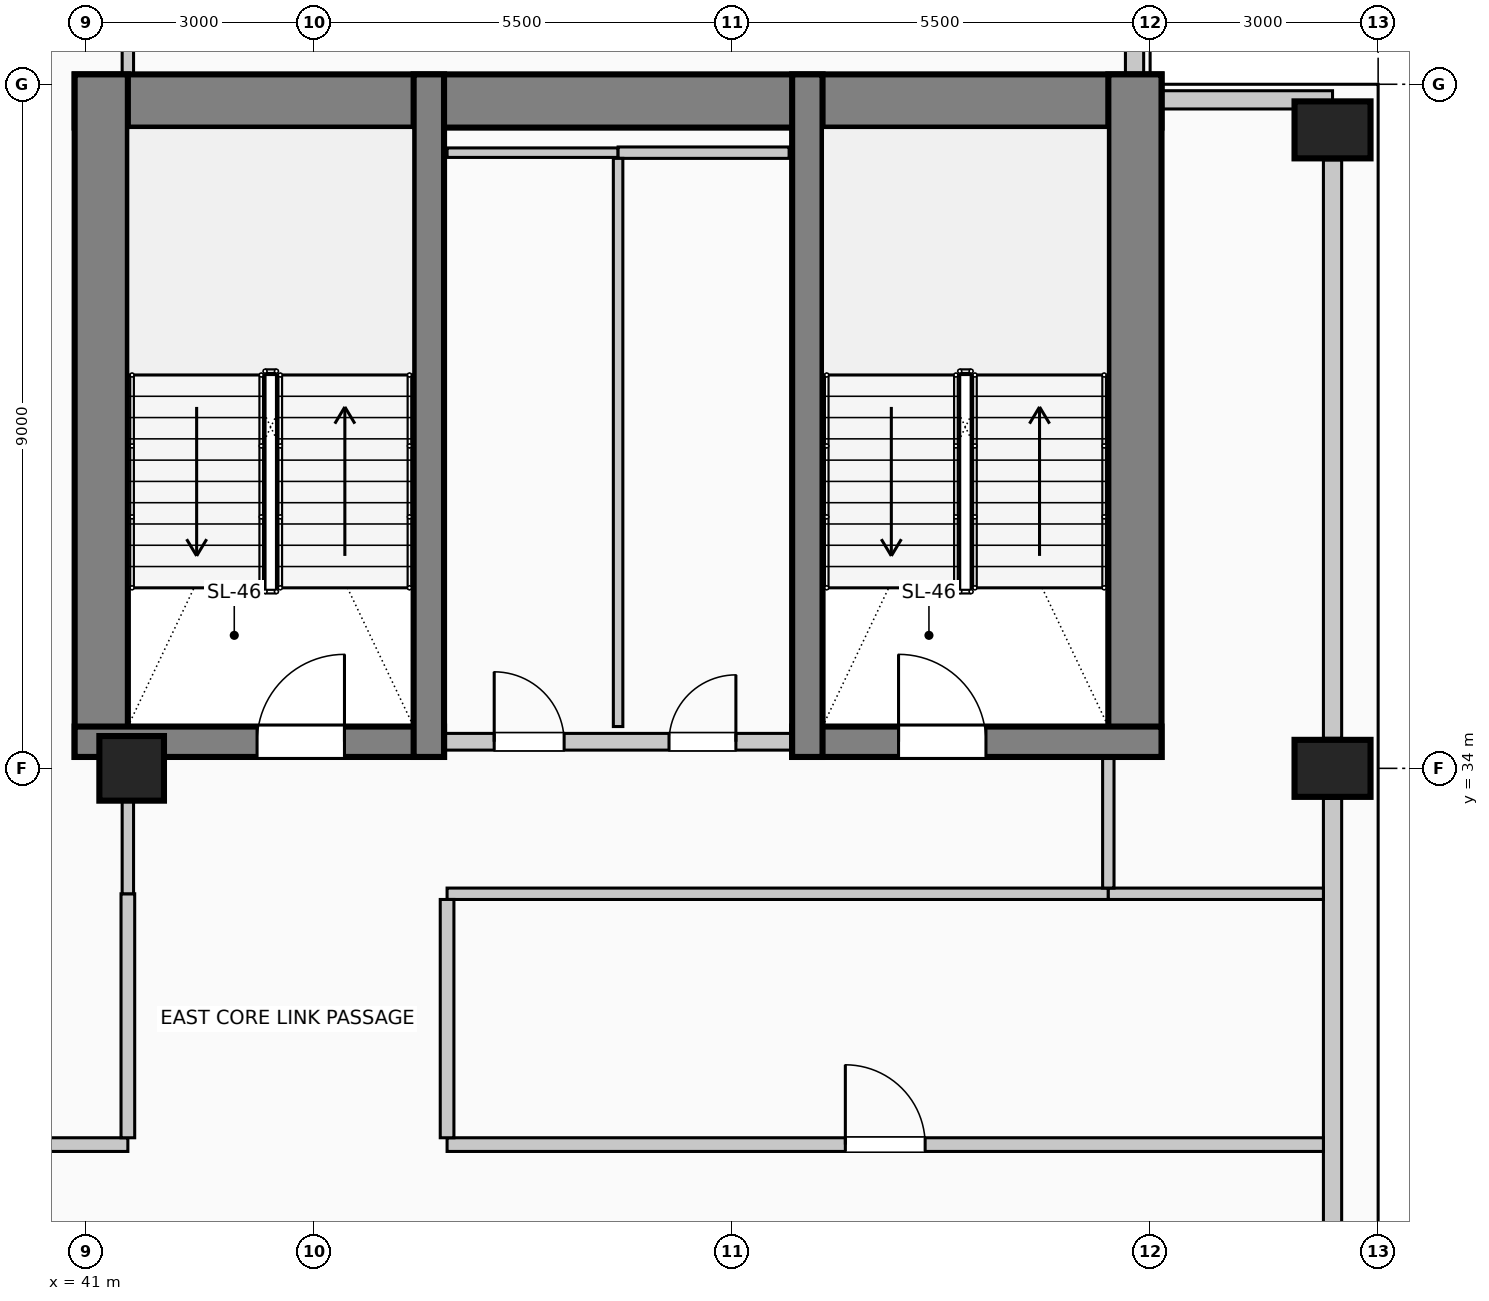
"""IFC4 building model, lengths in metres.
Left out: names, types, materials, properties, quantities, classifications, styles, units other than length and angle.
Written with IfcOpenShell. Run it as: python <this file> out.ifc"""

import sys

from ifc_helpers import new_model, si_unit, direction, frame, frame_2d, origin, origin_2d, place, context, subcontext, project, spatial, rectangle, circle, extrude, element, fill, save


model = new_model("IFC4")
c1 = context("Model", 3, precision=1e-05, world=origin(), true_north=direction((0.0, 1.0)))
c2 = subcontext(c1, "Body", "Model", "MODEL_VIEW")
j1 = project(units=[si_unit("LENGTHUNIT", "METRE"), si_unit("PLANEANGLEUNIT", "RADIAN")], contexts=[c1])
p1 = place(None, origin())
s1 = spatial("IfcSite", under=j1, at=p1, CompositionType="ELEMENT")
p2 = place(p1, origin())
s2 = spatial("IfcBuilding", under=s1, at=p2, CompositionType="ELEMENT")
p3 = place(p2, frame((0.0, 0.0, 256.6)))
s3 = spatial("IfcBuildingStorey", under=s2, at=p3, CompositionType="ELEMENT", Elevation=256.6)
p4 = place(p3, frame((40.85, 42.78, 0.0), z_axis=(0.0, 0.0, 1.0), x_axis=(1.0, 0.0, 0.0)))
e1 = element("IfcWall", 1, at=p4, inside=s3, PredefinedType="SHEAR", context=c2, shape_type="SweptSolid", body=[
    extrude(rectangle(XDim=14.3, YDim=0.7, at=frame_2d((7.15, 0.0))), origin(), (0.0, 0.0, 1.0), 4.0),
])
for number, where, z_axis, x_axis in (
    (2, (41.2, 34.15, 0.0), (0.0, 0.0, 1.0), (0.0, 1.0, 0.0)),
    (3, (54.8, 34.15, 0.0), (0.0, 0.0, 1.0), (0.0, 1.0, 0.0)),
):
    element("IfcWall", number, at=place(p3, frame(where, z_axis=z_axis, x_axis=x_axis)), inside=s3, PredefinedType="SHEAR", context=c2, shape_type="SweptSolid", body=[
        extrude(rectangle(XDim=8.98, YDim=0.7, at=frame_2d((4.49, 0.0))), origin(), (0.0, 0.0, 1.0), 4.0),
    ])
p5 = place(p3, frame((40.85, 34.35, 0.0), z_axis=(0.0, 0.0, 1.0), x_axis=(1.0, 0.0, 0.0)))
e4 = element("IfcWall", 4, at=p5, inside=s3, PredefinedType="SHEAR", context=c2, shape_type="SweptSolid", body=[
    extrude(rectangle(XDim=4.86, YDim=0.4, at=frame_2d((2.43, 0.0))), origin(), (0.0, 0.0, 1.0), 4.0),
])
p6 = place(p5, frame((2.4, 0.0, 0.0)))
e5 = element("IfcOpeningElement", 5, at=p6, cuts=e4, PredefinedType="OPENING", context=c2, shape_type="SweptSolid", body=[
    extrude(rectangle(XDim=1.15, YDim=2.2, at=frame_2d((0.575, 1.1))), frame((0.0, 0.21, 0.0), z_axis=(0.0, -1.0, 0.0), x_axis=(1.0, 0.0, 0.0)), (0.0, 0.0, 1.0), 0.42),
])
p7 = place(p3, frame((45.51, 34.15, 0.0), z_axis=(0.0, 0.0, 1.0), x_axis=(0.0, 1.0, 0.0)))
e6 = element("IfcWall", 6, at=p7, inside=s3, PredefinedType="SHEAR", context=c2, shape_type="SweptSolid", body=[
    extrude(rectangle(XDim=8.98, YDim=0.4, at=frame_2d((4.49, 0.0))), origin(), (0.0, 0.0, 1.0), 4.0),
])
p8 = place(p3, frame((50.29, 34.35, 0.0), z_axis=(0.0, 0.0, 1.0), x_axis=(1.0, 0.0, 0.0)))
e7 = element("IfcWall", 7, at=p8, inside=s3, PredefinedType="SHEAR", context=c2, shape_type="SweptSolid", body=[
    extrude(rectangle(XDim=4.86, YDim=0.4, at=frame_2d((2.43, 0.0))), origin(), (0.0, 0.0, 1.0), 4.0),
])
p9 = place(p8, frame((1.4, 0.0, 0.0)))
e8 = element("IfcOpeningElement", 8, at=p9, cuts=e7, PredefinedType="OPENING", context=c2, shape_type="SweptSolid", body=[
    extrude(rectangle(XDim=1.15, YDim=2.2, at=frame_2d((0.575, 1.1))), frame((0.0, 0.21, 0.0), z_axis=(0.0, -1.0, 0.0), x_axis=(1.0, 0.0, 0.0)), (0.0, 0.0, 1.0), 0.42),
])
p10 = place(p3, frame((50.49, 34.15, 0.0), z_axis=(0.0, 0.0, 1.0), x_axis=(0.0, 1.0, 0.0)))
e9 = element("IfcWall", 9, at=p10, inside=s3, PredefinedType="SHEAR", context=c2, shape_type="SweptSolid", body=[
    extrude(rectangle(XDim=8.98, YDim=0.4, at=frame_2d((4.49, 0.0))), origin(), (0.0, 0.0, 1.0), 4.0),
])
for number, where, z_axis, x_axis in (
    (10, (57.4, 34.0, 0.0), (0.0, 0.0, 1.0), (0.0, 1.0, 0.0)),
    (11, (57.4, 42.4, 0.0), (0.0, 0.0, 1.0), (0.0, 1.0, 0.0)),
):
    element("IfcColumn", number, at=place(p3, frame(where, z_axis=z_axis, x_axis=x_axis)), inside=s3, PredefinedType="COLUMN", context=c2, shape_type="SweptSolid", body=[
        extrude(rectangle(XDim=0.75, YDim=1.0, at=origin_2d()), origin(), (0.0, 0.0, 1.0), 4.0),
    ])
p11 = place(p3, frame((41.6, 34.0, 0.0), z_axis=(0.0, 0.0, 1.0), x_axis=(1.0, 0.0, 0.0)))
e12 = element("IfcColumn", 12, at=p11, inside=s3, PredefinedType="COLUMN", context=c2, shape_type="SweptSolid", body=[
    extrude(circle(Radius=0.425, at=origin_2d()), origin(), (0.0, 0.0, 1.0), 4.0),
])
p12 = place(p3, frame((57.4, 33.605, 0.0), z_axis=(0.0, 0.0, 1.0), x_axis=(0.0, -1.0, 0.0)))
e13 = element("IfcWall", 13, at=p12, inside=s3, PredefinedType="SOLIDWALL", context=c2, shape_type="SweptSolid", body=[
    extrude(rectangle(XDim=7.21, YDim=0.24, at=frame_2d((3.605, 0.0))), origin(), (0.0, 0.0, 1.0), 3.0),
])
p13 = place(p3, frame((57.4, 42.005, 0.0), z_axis=(0.0, 0.0, 1.0), x_axis=(0.0, -1.0, 0.0)))
e14 = element("IfcWall", 14, at=p13, inside=s3, PredefinedType="SOLIDWALL", context=c2, shape_type="SweptSolid", body=[
    extrude(rectangle(XDim=7.61, YDim=0.24, at=frame_2d((3.805, 0.0))), origin(), (0.0, 0.0, 1.0), 3.0),
])
p14 = place(p3, frame((54.795, 45.4, 0.0), z_axis=(0.0, 0.0, 1.0), x_axis=(0.0, -1.0, 0.0)))
e15 = element("IfcWall", 15, at=p14, inside=s3, PredefinedType="SOLIDWALL", context=c2, shape_type="SweptSolid", body=[
    extrude(rectangle(XDim=2.265, YDim=0.24, at=frame_2d((1.132, 0.0))), origin(), (0.0, 0.0, 1.0), 3.75),
])
p15 = place(p3, frame((55.155, 42.795, 0.0), z_axis=(0.0, 0.0, 1.0), x_axis=(1.0, 0.0, 0.0)))
e16 = element("IfcWall", 16, at=p15, inside=s3, PredefinedType="SOLIDWALL", context=c2, shape_type="SweptSolid", body=[
    extrude(rectangle(XDim=2.245, YDim=0.24, at=frame_2d((1.123, 0.0))), origin(), (0.0, 0.0, 1.0), 3.75),
])
p16 = place(p3, frame((45.72, 34.35, 0.0), z_axis=(0.0, 0.0, 1.0), x_axis=(1.0, 0.0, 0.0)))
e17 = element("IfcWall", 17, at=p16, inside=s3, PredefinedType="PARTITIONING", context=c2, shape_type="SweptSolid", body=[
    extrude(rectangle(XDim=4.56, YDim=0.22, at=frame_2d((2.28, 0.0))), origin(), (0.0, 0.0, 1.0), 3.75),
])
p17 = place(p16, frame((0.65, 0.0, 0.0)))
e18 = element("IfcOpeningElement", 18, at=p17, cuts=e17, PredefinedType="OPENING", context=c2, shape_type="SweptSolid", body=[
    extrude(rectangle(XDim=0.92, YDim=2.1, at=frame_2d((0.46, 1.05))), frame((0.0, 0.12, 0.0), z_axis=(0.0, -1.0, 0.0), x_axis=(1.0, 0.0, 0.0)), (0.0, 0.0, 1.0), 0.24),
])
p18 = place(p16, frame((2.95, 0.0, 0.0)))
e19 = element("IfcOpeningElement", 19, at=p18, cuts=e17, PredefinedType="OPENING", context=c2, shape_type="SweptSolid", body=[
    extrude(rectangle(XDim=0.88, YDim=2.1, at=frame_2d((0.44, 1.05))), frame((0.0, 0.12, 0.0), z_axis=(0.0, -1.0, 0.0), x_axis=(1.0, 0.0, 0.0)), (0.0, 0.0, 1.0), 0.24),
])
p19 = place(p3, frame((30.43, 29.05, 0.0), z_axis=(0.0, 0.0, 1.0), x_axis=(1.0, 0.0, 0.0)))
e20 = element("IfcWall", 20, at=p19, inside=s3, PredefinedType="PARTITIONING", context=c2, shape_type="SweptSolid", body=[
    extrude(rectangle(XDim=11.12, YDim=0.18, at=frame_2d((5.56, 0.0))), origin(), (0.0, 0.0, 1.0), 3.75),
])
p20 = place(p19, frame((5.085, 0.0, 0.0)))
e21 = element("IfcOpeningElement", 21, at=p20, cuts=e20, PredefinedType="OPENING", context=c2, shape_type="SweptSolid", body=[
    extrude(rectangle(XDim=0.95, YDim=2.15, at=frame_2d((0.475, 1.075))), frame((0.0, 0.1, 0.0), z_axis=(0.0, -1.0, 0.0), x_axis=(1.0, 0.0, 0.0)), (0.0, 0.0, 1.0), 0.2),
])
p21 = place(p3, frame((45.75, 29.05, 0.0), z_axis=(0.0, 0.0, 1.0), x_axis=(1.0, 0.0, 0.0)))
e22 = element("IfcWall", 22, at=p21, inside=s3, PredefinedType="PARTITIONING", context=c2, shape_type="SweptSolid", body=[
    extrude(rectangle(XDim=11.53, YDim=0.18, at=frame_2d((5.765, 0.0))), origin(), (0.0, 0.0, 1.0), 3.75),
])
p22 = place(p21, frame((5.24, 0.0, 0.0)))
e23 = element("IfcOpeningElement", 23, at=p22, cuts=e22, PredefinedType="OPENING", context=c2, shape_type="SweptSolid", body=[
    extrude(rectangle(XDim=1.05, YDim=2.15, at=frame_2d((0.525, 1.075))), frame((0.0, 0.1, 0.0), z_axis=(0.0, -1.0, 0.0), x_axis=(1.0, 0.0, 0.0)), (0.0, 0.0, 1.0), 0.2),
])
p23 = place(p3, frame((45.75, 32.35, 0.0), z_axis=(0.0, 0.0, 1.0), x_axis=(1.0, 0.0, 0.0)))
e24 = element("IfcWall", 24, at=p23, inside=s3, PredefinedType="PARTITIONING", context=c2, shape_type="SweptSolid", body=[
    extrude(rectangle(XDim=8.7, YDim=0.15, at=frame_2d((4.35, 0.0))), origin(), (0.0, 0.0, 1.0), 3.75),
])
p24 = place(p3, frame((54.45, 32.35, 0.0), z_axis=(0.0, 0.0, 1.0), x_axis=(1.0, 0.0, 0.0)))
e25 = element("IfcWall", 25, at=p24, inside=s3, PredefinedType="PARTITIONING", context=c2, shape_type="SweptSolid", body=[
    extrude(rectangle(XDim=2.83, YDim=0.15, at=frame_2d((1.415, 0.0))), origin(), (0.0, 0.0, 1.0), 3.75),
])
p25 = place(p3, frame((45.75, 42.1, 0.0), z_axis=(0.0, 0.0, 1.0), x_axis=(1.0, 0.0, 0.0)))
e26 = element("IfcWall", 26, at=p25, inside=s3, PredefinedType="PARTITIONING", context=c2, shape_type="SweptSolid", body=[
    extrude(rectangle(XDim=2.25, YDim=0.125, at=frame_2d((1.125, 0.0))), origin(), (0.0, 0.0, 1.0), 3.75),
])
p26 = place(p3, frame((48.0, 42.1, 0.0), z_axis=(0.0, 0.0, 1.0), x_axis=(1.0, 0.0, 0.0)))
e27 = element("IfcWall", 27, at=p26, inside=s3, PredefinedType="PARTITIONING", context=c2, shape_type="SweptSolid", body=[
    extrude(rectangle(XDim=2.25, YDim=0.15, at=frame_2d((1.125, 0.0))), origin(), (0.0, 0.0, 1.0), 3.75),
])
p27 = place(p3, frame((41.55, 29.14, 0.0), z_axis=(0.0, 0.0, 1.0), x_axis=(0.0, 1.0, 0.0)))
e28 = element("IfcWall", 28, at=p27, inside=s3, PredefinedType="PARTITIONING", context=c2, shape_type="SweptSolid", body=[
    extrude(rectangle(XDim=3.21, YDim=0.18, at=frame_2d((1.605, 0.0))), origin(), (0.0, 0.0, 1.0), 3.195),
])
p28 = place(p3, frame((41.55, 32.35, 0.0), z_axis=(0.0, 0.0, 1.0), x_axis=(0.0, 1.0, 0.0)))
e29 = element("IfcWall", 29, at=p28, inside=s3, PredefinedType="PARTITIONING", context=c2, shape_type="SweptSolid", body=[
    extrude(rectangle(XDim=1.225, YDim=0.15, at=frame_2d((0.612, 0.0))), origin(), (0.0, 0.0, 1.0), 3.195),
])
p29 = place(p3, frame((41.55, 43.13, 0.0), z_axis=(0.0, 0.0, 1.0), x_axis=(0.0, 1.0, 0.0)))
e30 = element("IfcWall", 30, at=p29, inside=s3, PredefinedType="PARTITIONING", context=c2, shape_type="SweptSolid", body=[
    extrude(rectangle(XDim=1.62, YDim=0.15, at=frame_2d((0.81, 0.0))), origin(), (0.0, 0.0, 1.0), 3.75),
])
p30 = place(p3, frame((45.75, 29.14, 0.0), z_axis=(0.0, 0.0, 1.0), x_axis=(0.0, 1.0, 0.0)))
e31 = element("IfcWall", 31, at=p30, inside=s3, PredefinedType="PARTITIONING", context=c2, shape_type="SweptSolid", body=[
    extrude(rectangle(XDim=3.135, YDim=0.18, at=frame_2d((1.567, 0.0))), origin(), (0.0, 0.0, 1.0), 3.75),
])
p31 = place(p3, frame((48.0, 34.55, 0.0), z_axis=(0.0, 0.0, 1.0), x_axis=(0.0, 1.0, 0.0)))
e32 = element("IfcWall", 32, at=p31, inside=s3, PredefinedType="PARTITIONING", context=c2, shape_type="SweptSolid", body=[
    extrude(rectangle(XDim=7.475, YDim=0.125, at=frame_2d((3.737, 0.0))), origin(), (0.0, 0.0, 1.0), 3.75),
])
p32 = place(p3, frame((54.45, 32.425, 0.0), z_axis=(0.0, 0.0, 1.0), x_axis=(0.0, 1.0, 0.0)))
e33 = element("IfcWall", 33, at=p32, inside=s3, PredefinedType="PARTITIONING", context=c2, shape_type="SweptSolid", body=[
    extrude(rectangle(XDim=1.725, YDim=0.15, at=frame_2d((0.862, 0.0))), origin(), (0.0, 0.0, 1.0), 3.75),
])
p33 = place(p6, origin())
e34 = element("IfcDoor", 34, at=p33, inside=s3, OperationType="SINGLE_SWING_RIGHT", PredefinedType="DOOR", context=c2, shape_type="SweptSolid", body=[
    extrude(rectangle(XDim=1.15, YDim=2.2, at=frame_2d((0.575, 1.1))), frame((0.0, 0.025, 0.0), z_axis=(0.0, -1.0, 0.0), x_axis=(1.0, 0.0, 0.0)), (0.0, 0.0, 1.0), 0.05),
])
fill(e5, e34)
p34 = place(p17, origin())
e35 = element("IfcDoor", 35, at=p34, inside=s3, OperationType="SINGLE_SWING_LEFT", PredefinedType="DOOR", context=c2, shape_type="SweptSolid", body=[
    extrude(rectangle(XDim=0.92, YDim=2.1, at=frame_2d((0.46, 1.05))), frame((0.0, 0.025, 0.0), z_axis=(0.0, -1.0, 0.0), x_axis=(1.0, 0.0, 0.0)), (0.0, 0.0, 1.0), 0.05),
])
fill(e18, e35)
p35 = place(p18, origin())
e36 = element("IfcDoor", 36, at=p35, inside=s3, OperationType="SINGLE_SWING_RIGHT", PredefinedType="DOOR", context=c2, shape_type="SweptSolid", body=[
    extrude(rectangle(XDim=0.88, YDim=2.1, at=frame_2d((0.44, 1.05))), frame((0.0, 0.025, 0.0), z_axis=(0.0, -1.0, 0.0), x_axis=(1.0, 0.0, 0.0)), (0.0, 0.0, 1.0), 0.05),
])
fill(e19, e36)
p36 = place(p9, origin())
e37 = element("IfcDoor", 37, at=p36, inside=s3, OperationType="SINGLE_SWING_LEFT", PredefinedType="DOOR", context=c2, shape_type="SweptSolid", body=[
    extrude(rectangle(XDim=1.15, YDim=2.2, at=frame_2d((0.575, 1.1))), frame((0.0, 0.025, 0.0), z_axis=(0.0, -1.0, 0.0), x_axis=(1.0, 0.0, 0.0)), (0.0, 0.0, 1.0), 0.05),
])
fill(e8, e37)
p37 = place(p22, origin())
e38 = element("IfcDoor", 38, at=p37, inside=s3, OperationType="SINGLE_SWING_LEFT", PredefinedType="DOOR", context=c2, shape_type="SweptSolid", body=[
    extrude(rectangle(XDim=1.05, YDim=2.15, at=frame_2d((0.525, 1.075))), frame((0.0, 0.025, 0.0), z_axis=(0.0, -1.0, 0.0), x_axis=(1.0, 0.0, 0.0)), (0.0, 0.0, 1.0), 0.05),
])
fill(e23, e38)
save(model, sys.argv[1])
